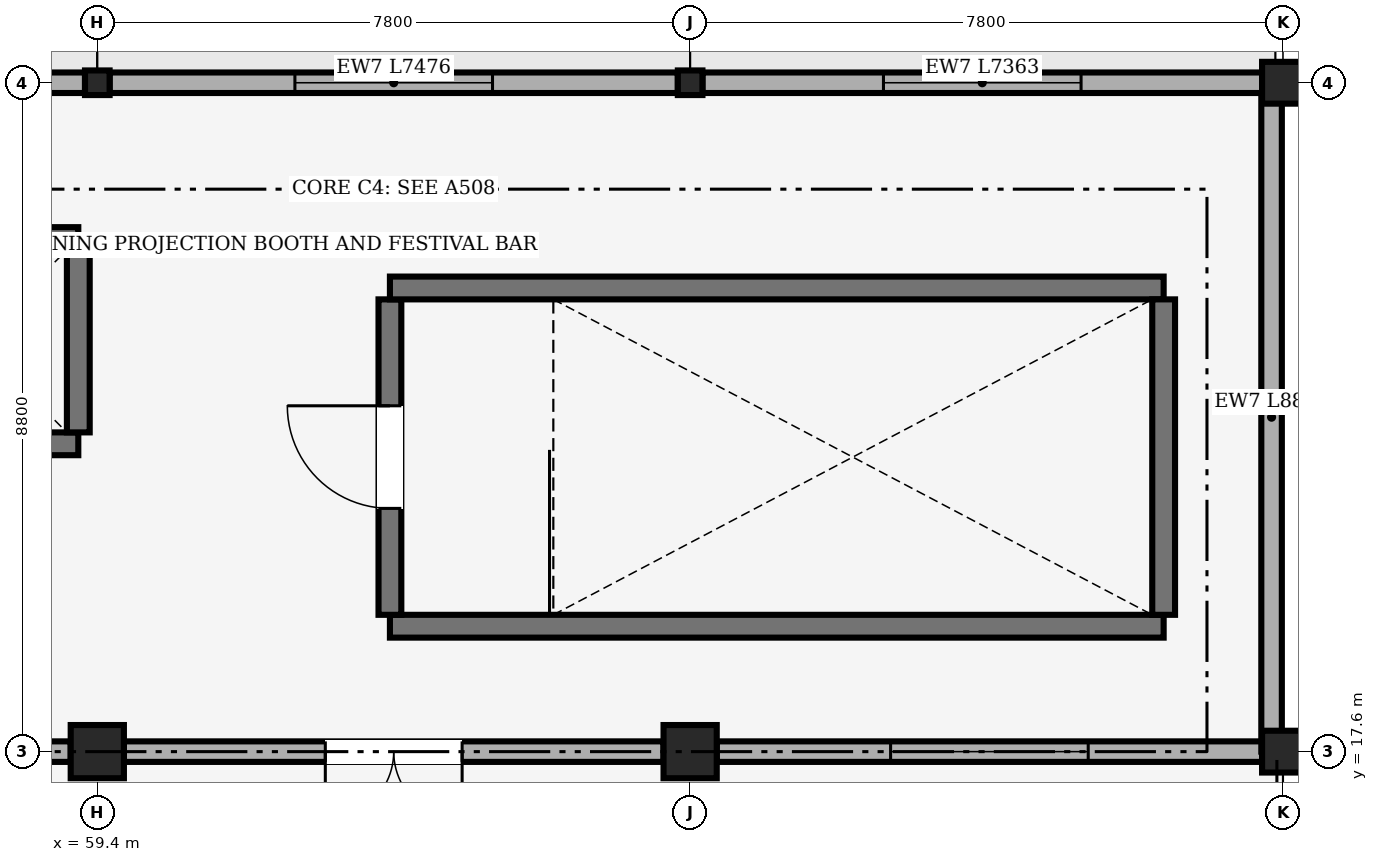
"""IFC4 building model, lengths in metres.
Left out: names, types, materials, properties, quantities, classifications, styles, units other than length and angle.
Written with IfcOpenShell. Run it as: python <this file> out.ifc"""

import sys

from ifc_helpers import new_model, si_unit, direction, frame, frame_2d, origin, origin_2d, place, context, subcontext, project, spatial, polyline, rectangle, circle, hollow_circle, outline, extrude, element, fill, save


model = new_model("IFC4")
c1 = context("Model", 3, precision=1e-05, world=origin(), true_north=direction((0.0, 1.0)))
c2 = subcontext(c1, "Body", "Model", "MODEL_VIEW")
j1 = project(units=[si_unit("LENGTHUNIT", "METRE"), si_unit("PLANEANGLEUNIT", "RADIAN")], contexts=[c1])
p1 = place(None, origin())
s1 = spatial("IfcSite", under=j1, at=p1, CompositionType="ELEMENT")
p2 = place(p1, origin())
s2 = spatial("IfcBuilding", under=s1, at=p2, CompositionType="ELEMENT")
p3 = place(p2, frame((0.0, 0.0, 19.05)))
s3 = spatial("IfcBuildingStorey", under=s2, at=p3, CompositionType="ELEMENT", Elevation=19.05)
p4 = place(p3, frame((59.4, 17.6, 0.0), z_axis=(0.0, 0.0, 1.0), x_axis=(1.0, 0.0, 0.0)))
e1 = element("IfcColumn", 1, at=p4, inside=s3, PredefinedType="COLUMN", context=c2, shape_type="SweptSolid", body=[
    extrude(circle(Radius=0.35, at=origin_2d()), origin(), (0.0, 0.0, 1.0), 3.3),
])
p5 = place(p3, frame((59.4, 26.4, 0.0), z_axis=(0.0, 0.0, 1.0), x_axis=(1.0, 0.0, 0.0)))
e2 = element("IfcColumn", 2, at=p5, inside=s3, PredefinedType="COLUMN", context=c2, shape_type="SweptSolid", body=[
    extrude(hollow_circle(Radius=0.162, WallThickness=0.01, at=origin_2d()), origin(), (0.0, 0.0, 1.0), 3.3),
])
p6 = place(p3, frame((67.2, 17.6, 0.0), z_axis=(0.0, 0.0, 1.0), x_axis=(1.0, 0.0, 0.0)))
e3 = element("IfcColumn", 3, at=p6, inside=s3, PredefinedType="COLUMN", context=c2, shape_type="SweptSolid", body=[
    extrude(circle(Radius=0.35, at=origin_2d()), origin(), (0.0, 0.0, 1.0), 3.3),
])
p7 = place(p3, frame((67.2, 26.4, 0.0), z_axis=(0.0, 0.0, 1.0), x_axis=(1.0, 0.0, 0.0)))
e4 = element("IfcColumn", 4, at=p7, inside=s3, PredefinedType="COLUMN", context=c2, shape_type="SweptSolid", body=[
    extrude(hollow_circle(Radius=0.162, WallThickness=0.01, at=origin_2d()), origin(), (0.0, 0.0, 1.0), 3.3),
])
for number, where, z_axis, x_axis in (
    (5, (75.0, 17.6, 0.0), (0.0, 0.0, 1.0), (1.0, 0.0, 0.0)),
    (6, (75.0, 26.4, 0.0), (0.0, 0.0, 1.0), (1.0, 0.0, 0.0)),
):
    element("IfcColumn", number, at=place(p3, frame(where, z_axis=z_axis, x_axis=x_axis)), inside=s3, PredefinedType="COLUMN", context=c2, shape_type="SweptSolid", body=[
        extrude(rectangle(XDim=0.55, YDim=0.55, at=origin_2d()), origin(), (0.0, 0.0, 1.0), 3.3),
    ])
p8 = place(p3, frame((74.725, 17.6, 0.0), z_axis=(0.0, 0.0, 1.0), x_axis=(-1.0, 0.0, 0.0)))
e7 = element("IfcWall", 7, at=p8, inside=s3, PredefinedType="SOLIDWALL", context=c2, shape_type="SweptSolid", body=[
    extrude(rectangle(XDim=7.175, YDim=0.27, at=frame_2d((3.587, 0.0))), origin(), (0.0, 0.0, 1.0), 5.37),
])
p9 = place(p8, frame((2.288, 0.0, 1.35)))
e8 = element("IfcOpeningElement", 8, at=p9, cuts=e7, PredefinedType="OPENING", context=c2, shape_type="SweptSolid", body=[
    extrude(rectangle(XDim=2.6, YDim=0.7, at=frame_2d((1.3, 0.35))), frame((0.0, 0.135, 0.0), z_axis=(0.0, -1.0, 0.0), x_axis=(1.0, 0.0, 0.0)), (0.0, 0.0, 1.0), 0.27),
])
p10 = place(p3, frame((66.85, 17.6, 0.0), z_axis=(0.0, 0.0, 1.0), x_axis=(-1.0, 0.0, 0.0)))
e9 = element("IfcWall", 9, at=p10, inside=s3, PredefinedType="SOLIDWALL", context=c2, shape_type="SweptSolid", body=[
    extrude(rectangle(XDim=7.1, YDim=0.27, at=frame_2d((3.55, 0.0))), origin(), (0.0, 0.0, 1.0), 5.37),
])
p11 = place(p10, frame((2.65, 0.0, 0.0)))
e10 = element("IfcOpeningElement", 10, at=p11, cuts=e9, PredefinedType="OPENING", context=c2, shape_type="SweptSolid", body=[
    extrude(rectangle(XDim=1.8, YDim=2.2, at=frame_2d((0.9, 1.1))), frame((0.0, 0.135, 0.0), z_axis=(0.0, -1.0, 0.0), x_axis=(1.0, 0.0, 0.0)), (0.0, 0.0, 1.0), 0.27),
])
p12 = place(p3, frame((59.05, 17.6, 0.0), z_axis=(0.0, 0.0, 1.0), x_axis=(-1.0, 0.0, 0.0)))
e11 = element("IfcWall", 11, at=p12, inside=s3, PredefinedType="SOLIDWALL", context=c2, shape_type="SweptSolid", body=[
    extrude(rectangle(XDim=7.1, YDim=0.27, at=frame_2d((3.55, 0.0))), origin(), (0.0, 0.0, 1.0), 5.37),
])
p13 = place(p12, frame((2.25, 0.0, 1.35)))
e12 = element("IfcOpeningElement", 12, at=p13, cuts=e11, PredefinedType="OPENING", context=c2, shape_type="SweptSolid", body=[
    extrude(rectangle(XDim=2.6, YDim=0.7, at=frame_2d((1.3, 0.35))), frame((0.0, 0.135, 0.0), z_axis=(0.0, -1.0, 0.0), x_axis=(1.0, 0.0, 0.0)), (0.0, 0.0, 1.0), 0.27),
])
p14 = place(p3, frame((74.85, 17.6, 0.0), z_axis=(0.0, 0.0, 1.0), x_axis=(0.0, 1.0, 0.0)))
e13 = element("IfcWall", 13, at=p14, inside=s3, PredefinedType="SOLIDWALL", context=c2, shape_type="SweptSolid", body=[
    extrude(outline(polyline([(0.0, 0.0), (8.8, 0.0), (8.8, 3.816), (0.0, 5.4), (0.0, 0.0)])), frame((0.0, 0.135, 0.0), z_axis=(0.0, -1.0, 0.0), x_axis=(1.0, 0.0, 0.0)), (0.0, 0.0, 1.0), 0.27),
])
p15 = place(p3, frame((51.762, 26.4, 0.0), z_axis=(0.0, 0.0, 1.0), x_axis=(1.0, 0.0, 0.0)))
e14 = element("IfcWall", 14, at=p15, inside=s3, PredefinedType="SOLIDWALL", context=c2, shape_type="SweptSolid", body=[
    extrude(rectangle(XDim=7.476, YDim=0.27, at=frame_2d((3.738, 0.0))), origin(), (0.0, 0.0, 1.0), 3.79),
])
p16 = place(p15, frame((2.438, 0.0, 1.35)))
e15 = element("IfcOpeningElement", 15, at=p16, cuts=e14, PredefinedType="OPENING", context=c2, shape_type="SweptSolid", body=[
    extrude(rectangle(XDim=2.6, YDim=0.7, at=frame_2d((1.3, 0.35))), frame((0.0, 0.135, 0.0), z_axis=(0.0, -1.0, 0.0), x_axis=(1.0, 0.0, 0.0)), (0.0, 0.0, 1.0), 0.27),
])
p17 = place(p3, frame((59.562, 26.4, 0.0), z_axis=(0.0, 0.0, 1.0), x_axis=(1.0, 0.0, 0.0)))
e16 = element("IfcWall", 16, at=p17, inside=s3, PredefinedType="SOLIDWALL", context=c2, shape_type="SweptSolid", body=[
    extrude(rectangle(XDim=7.476, YDim=0.27, at=frame_2d((3.738, 0.0))), origin(), (0.0, 0.0, 1.0), 3.79),
])
p18 = place(p17, frame((2.438, 0.0, 1.35)))
e17 = element("IfcOpeningElement", 17, at=p18, cuts=e16, PredefinedType="OPENING", context=c2, shape_type="SweptSolid", body=[
    extrude(rectangle(XDim=2.6, YDim=0.7, at=frame_2d((1.3, 0.35))), frame((0.0, 0.135, 0.0), z_axis=(0.0, -1.0, 0.0), x_axis=(1.0, 0.0, 0.0)), (0.0, 0.0, 1.0), 0.27),
])
p19 = place(p3, frame((67.362, 26.4, 0.0), z_axis=(0.0, 0.0, 1.0), x_axis=(1.0, 0.0, 0.0)))
e18 = element("IfcWall", 18, at=p19, inside=s3, PredefinedType="SOLIDWALL", context=c2, shape_type="SweptSolid", body=[
    extrude(rectangle(XDim=7.363, YDim=0.27, at=frame_2d((3.682, 0.0))), origin(), (0.0, 0.0, 1.0), 3.79),
])
p20 = place(p19, frame((2.382, 0.0, 1.35)))
e19 = element("IfcOpeningElement", 19, at=p20, cuts=e18, PredefinedType="OPENING", context=c2, shape_type="SweptSolid", body=[
    extrude(rectangle(XDim=2.6, YDim=0.7, at=frame_2d((1.3, 0.35))), frame((0.0, 0.135, 0.0), z_axis=(0.0, -1.0, 0.0), x_axis=(1.0, 0.0, 0.0)), (0.0, 0.0, 1.0), 0.27),
])
p21 = place(p3, frame((73.43, 19.25, 0.0), z_axis=(0.0, 0.0, 1.0), x_axis=(-1.0, 0.0, 0.0)))
e20 = element("IfcWall", 20, at=p21, inside=s3, PredefinedType="SHEAR", context=c2, shape_type="SweptSolid", body=[
    extrude(rectangle(XDim=10.18, YDim=0.3, at=frame_2d((5.09, 0.0))), origin(), (0.0, 0.0, 1.0), 3.06),
])
p22 = place(p3, frame((63.25, 19.4, 0.0), z_axis=(0.0, 0.0, 1.0), x_axis=(0.0, 1.0, 0.0)))
e21 = element("IfcWall", 21, at=p22, inside=s3, PredefinedType="SHEAR", context=c2, shape_type="SweptSolid", body=[
    extrude(rectangle(XDim=4.15, YDim=0.3, at=frame_2d((2.075, 0.0))), origin(), (0.0, 0.0, 1.0), 3.06),
])
p23 = place(p22, frame((1.4, 0.0, 0.0)))
e22 = element("IfcOpeningElement", 22, at=p23, cuts=e21, PredefinedType="OPENING", context=c2, shape_type="SweptSolid", body=[
    extrude(rectangle(XDim=1.35, YDim=2.2, at=frame_2d((0.675, 1.1))), frame((0.0, 0.15, 0.0), z_axis=(0.0, -1.0, 0.0), x_axis=(1.0, 0.0, 0.0)), (0.0, 0.0, 1.0), 0.3),
])
p24 = place(p3, frame((63.25, 23.7, 0.0), z_axis=(0.0, 0.0, 1.0), x_axis=(1.0, 0.0, 0.0)))
e23 = element("IfcWall", 23, at=p24, inside=s3, PredefinedType="SHEAR", context=c2, shape_type="SweptSolid", body=[
    extrude(rectangle(XDim=10.18, YDim=0.3, at=frame_2d((5.09, 0.0))), origin(), (0.0, 0.0, 1.0), 3.06),
])
p25 = place(p3, frame((73.43, 23.55, 0.0), z_axis=(0.0, 0.0, 1.0), x_axis=(0.0, -1.0, 0.0)))
e24 = element("IfcWall", 24, at=p25, inside=s3, PredefinedType="SHEAR", context=c2, shape_type="SweptSolid", body=[
    extrude(rectangle(XDim=4.15, YDim=0.3, at=frame_2d((2.075, 0.0))), origin(), (0.0, 0.0, 1.0), 3.06),
])
p26 = place(p3, frame((59.15, 21.65, 0.0), z_axis=(0.0, 0.0, 1.0), x_axis=(-1.0, 0.0, 0.0)))
e25 = element("IfcWall", 25, at=p26, inside=s3, PredefinedType="SHEAR", context=c2, shape_type="SweptSolid", body=[
    extrude(rectangle(XDim=2.95, YDim=0.3, at=frame_2d((1.475, 0.0))), origin(), (0.0, 0.0, 1.0), 3.06),
])
p27 = place(p26, frame((0.8, 0.0, 0.0)))
e26 = element("IfcOpeningElement", 26, at=p27, cuts=e25, PredefinedType="OPENING", context=c2, shape_type="SweptSolid", body=[
    extrude(rectangle(XDim=1.1, YDim=2.1, at=frame_2d((0.55, 1.05))), frame((0.0, 0.15, 0.0), z_axis=(0.0, -1.0, 0.0), x_axis=(1.0, 0.0, 0.0)), (0.0, 0.0, 1.0), 0.3),
])
p28 = place(p3, frame((56.2, 24.35, 0.0), z_axis=(0.0, 0.0, 1.0), x_axis=(1.0, 0.0, 0.0)))
e27 = element("IfcWall", 27, at=p28, inside=s3, PredefinedType="SHEAR", context=c2, shape_type="SweptSolid", body=[
    extrude(rectangle(XDim=2.95, YDim=0.3, at=frame_2d((1.475, 0.0))), origin(), (0.0, 0.0, 1.0), 3.06),
])
p29 = place(p3, frame((59.15, 24.2, 0.0), z_axis=(0.0, 0.0, 1.0), x_axis=(0.0, -1.0, 0.0)))
e28 = element("IfcWall", 28, at=p29, inside=s3, PredefinedType="SHEAR", context=c2, shape_type="SweptSolid", body=[
    extrude(rectangle(XDim=2.4, YDim=0.3, at=frame_2d((1.2, 0.0))), origin(), (0.0, 0.0, 1.0), 3.06),
])
p30 = place(p9, origin())
e29 = element("IfcWindow", 29, at=p30, inside=s3, PartitioningType="SINGLE_PANEL", PredefinedType="WINDOW", context=c2, shape_type="SweptSolid", body=[
    extrude(rectangle(XDim=2.6, YDim=0.7, at=frame_2d((1.3, 0.35))), frame((0.0, 0.03, 0.0), z_axis=(0.0, -1.0, 0.0), x_axis=(1.0, 0.0, 0.0)), (0.0, 0.0, 1.0), 0.06),
])
fill(e8, e29)
p31 = place(p11, origin())
e30 = element("IfcDoor", 30, at=p31, inside=s3, OperationType="DOUBLE_DOOR_SINGLE_SWING", PredefinedType="DOOR", context=c2, shape_type="SweptSolid", body=[
    extrude(rectangle(XDim=1.8, YDim=2.2, at=frame_2d((0.9, 1.1))), frame((0.0, 0.025, 0.0), z_axis=(0.0, -1.0, 0.0), x_axis=(1.0, 0.0, 0.0)), (0.0, 0.0, 1.0), 0.05),
])
fill(e10, e30)
p32 = place(p18, origin())
e31 = element("IfcWindow", 31, at=p32, inside=s3, PartitioningType="SINGLE_PANEL", PredefinedType="WINDOW", context=c2, shape_type="SweptSolid", body=[
    extrude(rectangle(XDim=2.6, YDim=0.7, at=frame_2d((1.3, 0.35))), frame((0.0, 0.03, 0.0), z_axis=(0.0, -1.0, 0.0), x_axis=(1.0, 0.0, 0.0)), (0.0, 0.0, 1.0), 0.06),
])
fill(e17, e31)
p33 = place(p20, origin())
e32 = element("IfcWindow", 32, at=p33, inside=s3, PartitioningType="SINGLE_PANEL", PredefinedType="WINDOW", context=c2, shape_type="SweptSolid", body=[
    extrude(rectangle(XDim=2.6, YDim=0.7, at=frame_2d((1.3, 0.35))), frame((0.0, 0.03, 0.0), z_axis=(0.0, -1.0, 0.0), x_axis=(1.0, 0.0, 0.0)), (0.0, 0.0, 1.0), 0.06),
])
fill(e19, e32)
p34 = place(p23, origin())
e33 = element("IfcDoor", 33, at=p34, inside=s3, OperationType="SINGLE_SWING_RIGHT", PredefinedType="DOOR", context=c2, shape_type="SweptSolid", body=[
    extrude(rectangle(XDim=1.35, YDim=2.2, at=frame_2d((0.675, 1.1))), frame((0.0, 0.025, 0.0), z_axis=(0.0, -1.0, 0.0), x_axis=(1.0, 0.0, 0.0)), (0.0, 0.0, 1.0), 0.05),
])
fill(e22, e33)
save(model, sys.argv[1])
